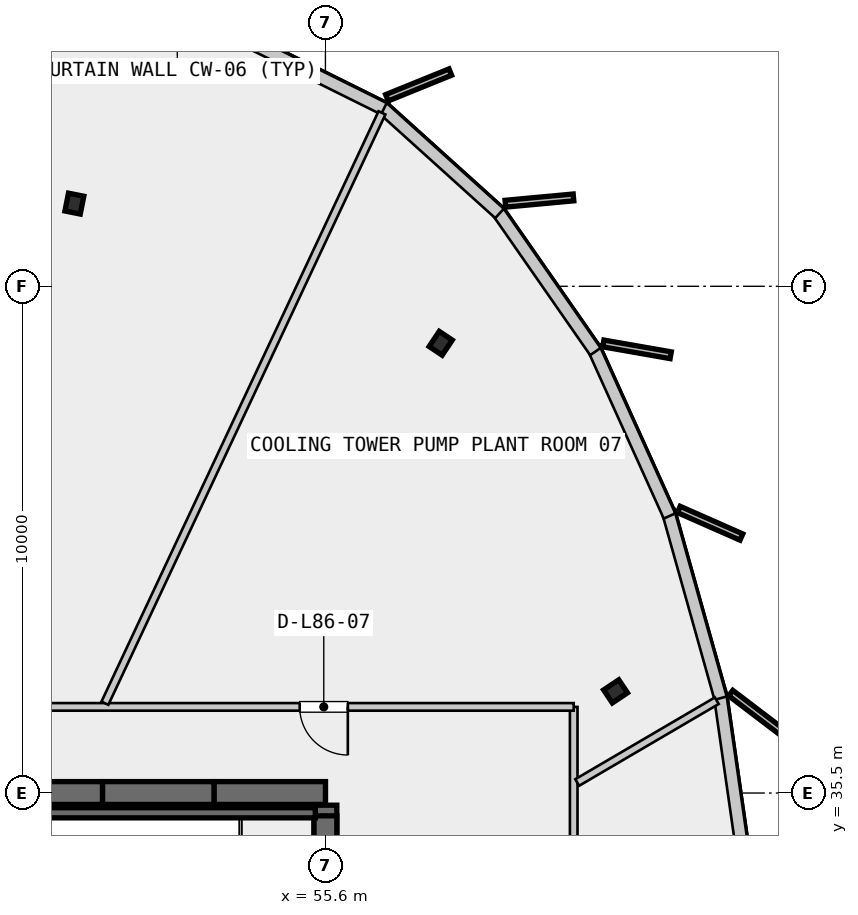
"""IFC4 building model, lengths in metres.
Left out: names, types, materials, properties, quantities, classifications, styles, units other than length and angle.
Written with IfcOpenShell. Run it as: python <this file> out.ifc"""

import sys

from ifc_helpers import new_model, si_unit, direction, frame, frame_2d, origin, origin_2d, place, context, subcontext, project, spatial, rectangle, i_section, extrude, source, transform, mapped, element, fill, save


model = new_model("IFC4")
c1 = context("Model", 3, precision=1e-05, world=origin(), true_north=direction((0.0, 1.0)))
c2 = subcontext(c1, "Body", "Model", "MODEL_VIEW")
j1 = project(units=[si_unit("LENGTHUNIT", "METRE"), si_unit("PLANEANGLEUNIT", "RADIAN")], contexts=[c1])
p1 = place(None, origin())
s1 = spatial("IfcSite", under=j1, at=p1, CompositionType="ELEMENT")
p2 = place(p1, origin())
s2 = spatial("IfcBuilding", under=s1, at=p2, CompositionType="ELEMENT")
p3 = place(p2, frame((0.0, 0.0, 324.3)))
s3 = spatial("IfcBuildingStorey", under=s2, at=p3, CompositionType="ELEMENT", Elevation=324.3)
p4 = place(p3, frame((55.6, 35.5, 0.0), z_axis=(0.0, 0.0, 1.0), x_axis=(-1.0, 0.0, 0.0)))
e1 = element("IfcWall", 1, at=p4, inside=s3, PredefinedType="SHEAR", context=c2, shape_type="SweptSolid", body=[
    extrude(rectangle(XDim=17.6, YDim=0.45, at=frame_2d((8.8, 0.0))), origin(), (0.0, 0.0, 1.0), 4.2),
])
p5 = place(p4, frame((8.05, 0.0, 0.0)))
e2 = element("IfcOpeningElement", 2, at=p5, cuts=e1, PredefinedType="OPENING", context=c2, shape_type="SweptSolid", body=[
    extrude(rectangle(XDim=1.5, YDim=2.2, at=frame_2d((0.75, 1.1))), frame((0.0, 0.235, 0.0), z_axis=(0.0, -1.0, 0.0), x_axis=(1.0, 0.0, 0.0)), (0.0, 0.0, 1.0), 0.47),
])
p6 = place(p4, frame((15.1, 0.0, 0.0)))
e3 = element("IfcOpeningElement", 3, at=p6, cuts=e1, PredefinedType="OPENING", context=c2, shape_type="SweptSolid", body=[
    extrude(rectangle(XDim=0.95, YDim=2.15, at=frame_2d((0.475, 1.075))), frame((0.0, 0.235, 0.0), z_axis=(0.0, -1.0, 0.0), x_axis=(1.0, 0.0, 0.0)), (0.0, 0.0, 1.0), 0.47),
])
p7 = place(p4, frame((12.9, 0.0, 0.0)))
e4 = element("IfcOpeningElement", 4, at=p7, cuts=e1, PredefinedType="OPENING", context=c2, shape_type="SweptSolid", body=[
    extrude(rectangle(XDim=0.9, YDim=2.15, at=frame_2d((0.45, 1.075))), frame((0.0, 0.235, 0.0), z_axis=(0.0, -1.0, 0.0), x_axis=(1.0, 0.0, 0.0)), (0.0, 0.0, 1.0), 0.47),
])
p8 = place(p4, frame((10.6, 0.0, 0.0)))
e5 = element("IfcOpeningElement", 5, at=p8, cuts=e1, PredefinedType="OPENING", context=c2, shape_type="SweptSolid", body=[
    extrude(rectangle(XDim=0.95, YDim=2.15, at=frame_2d((0.475, 1.075))), frame((0.0, 0.235, 0.0), z_axis=(0.0, -1.0, 0.0), x_axis=(1.0, 0.0, 0.0)), (0.0, 0.0, 1.0), 0.47),
])
p9 = place(p3, frame((55.6, 20.34, 0.0), z_axis=(0.0, 0.0, 1.0), x_axis=(0.0, 1.0, 0.0)))
e6 = element("IfcWall", 6, at=p9, inside=s3, PredefinedType="SHEAR", context=c2, shape_type="SweptSolid", body=[
    extrude(rectangle(XDim=14.92, YDim=0.45, at=frame_2d((7.46, 0.0))), origin(), (0.0, 0.0, 1.0), 4.2),
])
p10 = place(p9, frame((12.71, 0.0, 0.0)))
e7 = element("IfcOpeningElement", 7, at=p10, cuts=e6, PredefinedType="OPENING", context=c2, shape_type="SweptSolid", body=[
    extrude(rectangle(XDim=1.05, YDim=2.15, at=frame_2d((0.525, 1.075))), frame((0.0, 0.235, 0.0), z_axis=(0.0, -1.0, 0.0), x_axis=(1.0, 0.0, 0.0)), (0.0, 0.0, 1.0), 0.47),
])
p11 = place(p9, frame((8.61, 0.0, 0.0)))
e8 = element("IfcOpeningElement", 8, at=p11, cuts=e6, PredefinedType="OPENING", context=c2, shape_type="SweptSolid", body=[
    extrude(rectangle(XDim=1.1, YDim=2.2, at=frame_2d((0.55, 1.1))), frame((0.0, 0.235, 0.0), z_axis=(0.0, -1.0, 0.0), x_axis=(1.0, 0.0, 0.0)), (0.0, 0.0, 1.0), 0.47),
])
m1 = source(origin(), c2, "Body", "SweptSolid", [
    extrude(i_section(OverallWidth=0.309, OverallDepth=0.359, WebThickness=0.016, FlangeThickness=0.026, FilletRadius=0.027, at=origin_2d()), origin(), (0.0, 0.0, 1.0), 10.338),
])
p12 = place(p3, frame((61.326, 37.506, 0.0), z_axis=(0.0, 0.0, 1.0), x_axis=(0.831469612303, 0.55557023302, 0.0)))
e9 = element("IfcColumn", 9, at=p12, inside=s3, PredefinedType="COLUMN", context=c2, shape_type="MappedRepresentation", body=[
    mapped(m1, transform((0.0, 0.0, 0.0), scale=1.0)),
])
m2 = source(origin(), c2, "Body", "SweptSolid", [
    extrude(i_section(OverallWidth=0.309, OverallDepth=0.359, WebThickness=0.016, FlangeThickness=0.026, FilletRadius=0.027, at=origin_2d()), origin(), (0.0, 0.0, 1.0), 11.349),
])
p13 = place(p3, frame((57.875, 44.375, 0.0), z_axis=(0.0, 0.0, 1.0), x_axis=(0.55557023302, 0.831469612303, 0.0)))
e10 = element("IfcColumn", 10, at=p13, inside=s3, PredefinedType="COLUMN", context=c2, shape_type="MappedRepresentation", body=[
    mapped(m2, transform((0.0, 0.0, 0.0), scale=1.0)),
])
m3 = source(origin(), c2, "Body", "SweptSolid", [
    extrude(i_section(OverallWidth=0.309, OverallDepth=0.359, WebThickness=0.016, FlangeThickness=0.026, FilletRadius=0.027, at=origin_2d()), origin(), (0.0, 0.0, 1.0), 11.421),
])
p14 = place(p3, frame((50.645, 47.132, 0.0), z_axis=(0.0, 0.0, 1.0), x_axis=(0.195090322016, 0.980785280403, 0.0)))
e11 = element("IfcColumn", 11, at=p14, inside=s3, PredefinedType="COLUMN", context=c2, shape_type="MappedRepresentation", body=[
    mapped(m3, transform((0.0, 0.0, 0.0), scale=1.0)),
])
p15 = place(p3, frame((55.6, 35.5, 4.2), z_axis=(0.0, 0.0, 1.0), x_axis=(-1.0, 0.0, 0.0)))
e12 = element("IfcWall", 12, at=p15, inside=s3, PredefinedType="SHEAR", context=c2, shape_type="SweptSolid", body=[
    extrude(rectangle(XDim=2.2, YDim=0.45, at=frame_2d((1.1, 0.0))), origin(), (0.0, 0.0, 1.0), 5.342),
])
p16 = place(p3, frame((53.4, 35.5, 4.2), z_axis=(0.0, 0.0, 1.0), x_axis=(-1.0, 0.0, 0.0)))
e13 = element("IfcWall", 13, at=p16, inside=s3, PredefinedType="SHEAR", context=c2, shape_type="SweptSolid", body=[
    extrude(rectangle(XDim=2.2, YDim=0.45, at=frame_2d((1.1, 0.0))), origin(), (0.0, 0.0, 1.0), 5.216),
])
p17 = place(p3, frame((51.2, 35.5, 4.2), z_axis=(0.0, 0.0, 1.0), x_axis=(-1.0, 0.0, 0.0)))
e14 = element("IfcWall", 14, at=p17, inside=s3, PredefinedType="SHEAR", context=c2, shape_type="SweptSolid", body=[
    extrude(rectangle(XDim=2.2, YDim=0.45, at=frame_2d((1.1, 0.0))), origin(), (0.0, 0.0, 1.0), 5.091),
])
p18 = place(p3, frame((55.6, 33.238, 4.2), z_axis=(0.0, 0.0, 1.0), x_axis=(0.0, 1.0, 0.0)))
e15 = element("IfcWall", 15, at=p18, inside=s3, PredefinedType="SHEAR", context=c2, shape_type="SweptSolid", body=[
    extrude(rectangle(XDim=1.812, YDim=0.45, at=frame_2d((0.906, 0.0))), origin(), (0.0, 0.0, 1.0), 5.07),
])
p19 = place(p3, frame((63.94, 33.598, 9.822), z_axis=(0.0, 0.0, 1.0), x_axis=(-0.142135182267, 0.989847255874, 0.0)))
e16 = element("IfcWall", 16, at=p19, inside=s3, PredefinedType="PARAPET", context=c2, shape_type="SweptSolid", body=[
    extrude(rectangle(XDim=3.83, YDim=0.25, at=frame_2d((1.915, 0.0))), origin(), (0.0, 0.0, 1.0), 0.338),
])
p20 = place(p3, frame((63.399, 37.372, 10.458), z_axis=(0.0, 0.0, 1.0), x_axis=(-0.270399124289, 0.962748312688, 0.0)))
e17 = element("IfcWall", 17, at=p20, inside=s3, PredefinedType="PARAPET", context=c2, shape_type="SweptSolid", body=[
    extrude(rectangle(XDim=3.755, YDim=0.25, at=frame_2d((1.877, 0.0))), origin(), (0.0, 0.0, 1.0), 0.309),
])
p21 = place(p3, frame((62.391, 40.967, 11.035), z_axis=(0.0, 0.0, 1.0), x_axis=(-0.411641466658, 0.911345874478, 0.0)))
e18 = element("IfcWall", 18, at=p21, inside=s3, PredefinedType="PARAPET", context=c2, shape_type="SweptSolid", body=[
    extrude(rectangle(XDim=3.585, YDim=0.25, at=frame_2d((1.792, 0.0))), origin(), (0.0, 0.0, 1.0), 0.265),
])
p22 = place(p3, frame((60.928, 44.212, 11.526), z_axis=(0.0, 0.0, 1.0), x_axis=(-0.571171238623, 0.82083093032, 0.0)))
e19 = element("IfcWall", 19, at=p22, inside=s3, PredefinedType="PARAPET", context=c2, shape_type="SweptSolid", body=[
    extrude(rectangle(XDim=3.35, YDim=0.25, at=frame_2d((1.675, 0.0))), origin(), (0.0, 0.0, 1.0), 0.207),
])
p23 = place(p3, frame((59.035, 46.938, 11.9), z_axis=(0.0, 0.0, 1.0), x_axis=(-0.742338940016, 0.670024550398, 0.0)))
e20 = element("IfcWall", 20, at=p23, inside=s3, PredefinedType="PARAPET", context=c2, shape_type="SweptSolid", body=[
    extrude(rectangle(XDim=3.116, YDim=0.25, at=frame_2d((1.558, 0.0))), origin(), (0.0, 0.0, 1.0), 0.137),
])
p24 = place(p3, frame((56.754, 49.004, 12.135), z_axis=(0.0, 0.0, 1.0), x_axis=(-0.895723826452, 0.444610871129, 0.0)))
e21 = element("IfcWall", 21, at=p24, inside=s3, PredefinedType="PARAPET", context=c2, shape_type="SweptSolid", body=[
    extrude(rectangle(XDim=2.966, YDim=0.25, at=frame_2d((1.483, 0.0))), origin(), (0.0, 0.0, 1.0), 0.06),
])
p25 = place(p3, frame((48.05, 35.11, 0.0), z_axis=(0.0, 0.0, 1.0), x_axis=(1.0, 0.0, 0.0)))
e22 = element("IfcWall", 22, at=p25, inside=s3, PredefinedType="SHEAR", context=c2, shape_type="SweptSolid", body=[
    extrude(rectangle(XDim=7.35, YDim=0.2, at=frame_2d((3.675, 0.0))), origin(), (0.0, 0.0, 1.0), 4.2),
])
p26 = place(p3, frame((60.5, 18.4, 0.0), z_axis=(0.0, 0.0, 1.0), x_axis=(0.0, 1.0, 0.0)))
e23 = element("IfcWall", 23, at=p26, inside=s3, PredefinedType="PARTITIONING", context=c2, shape_type="SweptSolid", body=[
    extrude(rectangle(XDim=18.8, YDim=0.15, at=frame_2d((9.4, 0.0))), origin(), (0.0, 0.0, 1.0), 3.49),
])
p27 = place(p26, frame((4.508, 0.0, 0.0)))
e24 = element("IfcOpeningElement", 24, at=p27, cuts=e23, PredefinedType="OPENING", context=c2, shape_type="SweptSolid", body=[
    extrude(rectangle(XDim=0.95, YDim=2.15, at=frame_2d((0.475, 1.075))), frame((0.0, 0.085, 0.0), z_axis=(0.0, -1.0, 0.0), x_axis=(1.0, 0.0, 0.0)), (0.0, 0.0, 1.0), 0.17),
])
p28 = place(p26, frame((13.673, 0.0, 0.0)))
e25 = element("IfcOpeningElement", 25, at=p28, cuts=e23, PredefinedType="OPENING", context=c2, shape_type="SweptSolid", body=[
    extrude(rectangle(XDim=0.95, YDim=2.15, at=frame_2d((0.475, 1.075))), frame((0.0, 0.085, 0.0), z_axis=(0.0, -1.0, 0.0), x_axis=(1.0, 0.0, 0.0)), (0.0, 0.0, 1.0), 0.17),
])
p29 = place(p3, frame((60.5, 37.2, 0.0), z_axis=(0.0, 0.0, 1.0), x_axis=(-1.0, 0.0, 0.0)))
e26 = element("IfcWall", 26, at=p29, inside=s3, PredefinedType="PARTITIONING", context=c2, shape_type="SweptSolid", body=[
    extrude(rectangle(XDim=27.4, YDim=0.15, at=frame_2d((13.7, 0.0))), origin(), (0.0, 0.0, 1.0), 3.49),
])
p30 = place(p29, frame((4.458, 0.0, 0.0)))
e27 = element("IfcOpeningElement", 27, at=p30, cuts=e26, PredefinedType="OPENING", context=c2, shape_type="SweptSolid", body=[
    extrude(rectangle(XDim=0.95, YDim=2.15, at=frame_2d((0.475, 1.075))), frame((0.0, 0.085, 0.0), z_axis=(0.0, -1.0, 0.0), x_axis=(1.0, 0.0, 0.0)), (0.0, 0.0, 1.0), 0.17),
])
p31 = place(p29, frame((13.122, 0.0, 0.0)))
e28 = element("IfcOpeningElement", 28, at=p31, cuts=e26, PredefinedType="OPENING", context=c2, shape_type="SweptSolid", body=[
    extrude(rectangle(XDim=0.95, YDim=2.15, at=frame_2d((0.475, 1.075))), frame((0.0, 0.085, 0.0), z_axis=(0.0, -1.0, 0.0), x_axis=(1.0, 0.0, 0.0)), (0.0, 0.0, 1.0), 0.17),
])
p32 = place(p29, frame((20.51, 0.0, 0.0)))
e29 = element("IfcOpeningElement", 29, at=p32, cuts=e26, PredefinedType="OPENING", context=c2, shape_type="SweptSolid", body=[
    extrude(rectangle(XDim=0.95, YDim=2.15, at=frame_2d((0.475, 1.075))), frame((0.0, 0.085, 0.0), z_axis=(0.0, -1.0, 0.0), x_axis=(1.0, 0.0, 0.0)), (0.0, 0.0, 1.0), 0.17),
])
p33 = place(p3, frame((60.569, 35.708, 0.0), z_axis=(0.0, 0.0, 1.0), x_axis=(0.862817602566, 0.505515365446, 0.0)))
e30 = element("IfcWall", 30, at=p33, inside=s3, PredefinedType="PARTITIONING", context=c2, shape_type="SweptSolid", body=[
    extrude(rectangle(XDim=3.192, YDim=0.15, at=frame_2d((1.596, 0.0))), origin(), (0.0, 0.0, 1.0), 3.49),
])
p34 = place(p3, frame((51.248, 37.272, 0.0), z_axis=(0.0, 0.0, 1.0), x_axis=(0.424864941596, 0.905256748885, 0.0)))
e31 = element("IfcWall", 31, at=p34, inside=s3, PredefinedType="PARTITIONING", context=c2, shape_type="SweptSolid", body=[
    extrude(rectangle(XDim=12.869, YDim=0.15, at=frame_2d((6.435, 0.0))), origin(), (0.0, 0.0, 1.0), 3.49),
])
m4 = source(origin(), c2, "Body", "SweptSolid", [
    extrude(rectangle(XDim=0.95, YDim=2.15, at=frame_2d((0.475, 1.075))), frame((0.0, 0.025, 0.0), z_axis=(0.0, -1.0, 0.0), x_axis=(1.0, 0.0, 0.0)), (0.0, 0.0, 1.0), 0.05),
])
p35 = place(p30, origin())
e32 = element("IfcDoor", 32, at=p35, inside=s3, OperationType="SINGLE_SWING_LEFT", PredefinedType="DOOR", context=c2, shape_type="MappedRepresentation", body=[
    mapped(m4, transform((0.0, 0.0, 0.0), scale=1.0)),
])
fill(e27, e32)
save(model, sys.argv[1])
